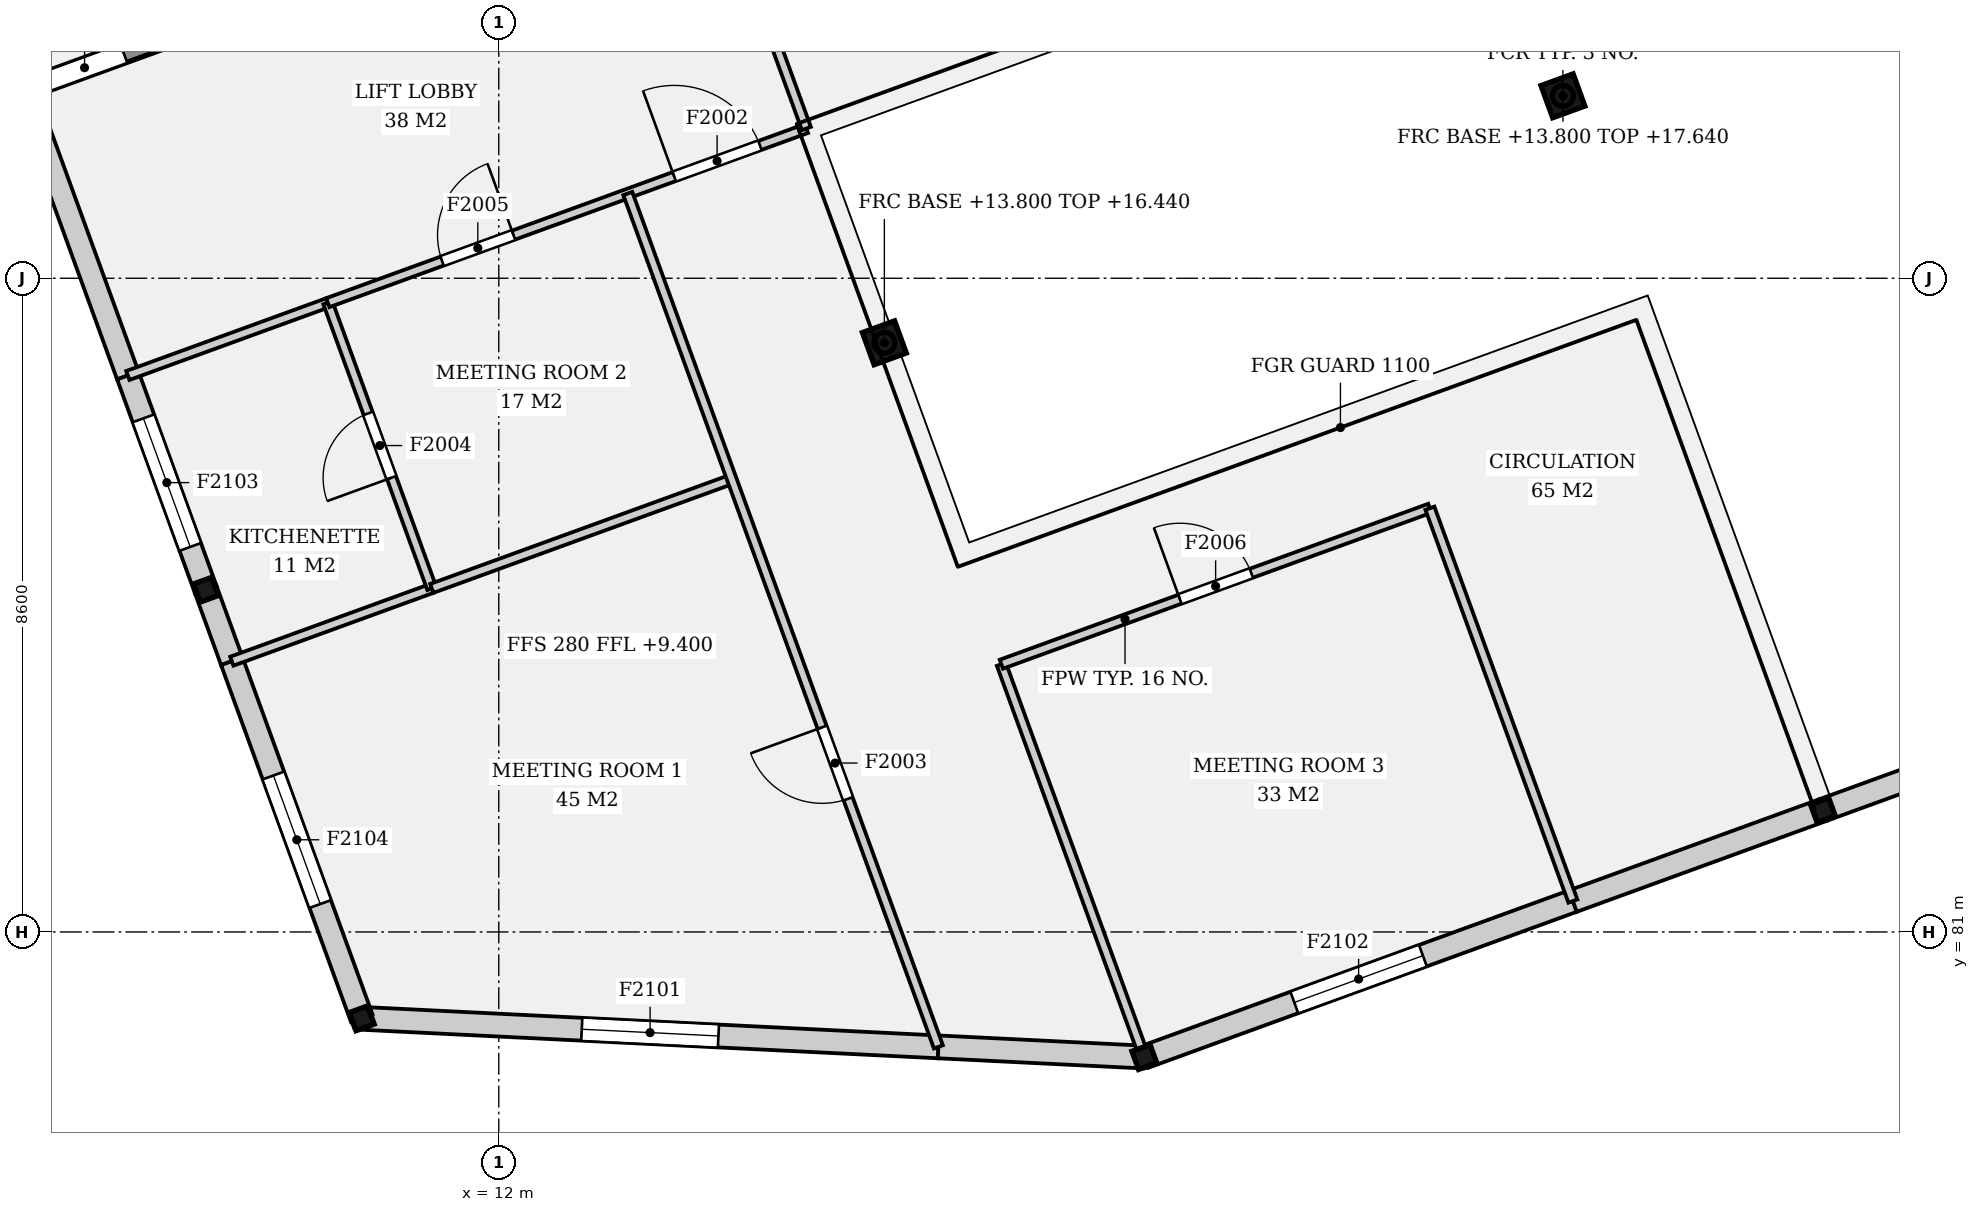
"""IFC4 building model, lengths in metres.
Left out: names, types, materials, properties, quantities, classifications, styles, units other than length and angle.
Written with IfcOpenShell. Run it as: python <this file> out.ifc"""

import sys

from ifc_helpers import new_model, si_unit, direction, frame, frame_2d, origin, origin_2d, place, context, subcontext, project, spatial, rectangle, hollow_rectangle, hollow_circle, extrude, element, fill, save


model = new_model("IFC4")
c1 = context("Model", 3, precision=1e-05, world=origin(), true_north=direction((0.0, 1.0)))
c2 = subcontext(c1, "Body", "Model", "MODEL_VIEW")
j1 = project(units=[si_unit("LENGTHUNIT", "METRE"), si_unit("PLANEANGLEUNIT", "RADIAN")], contexts=[c1])
p1 = place(None, origin())
s1 = spatial("IfcSite", under=j1, at=p1, CompositionType="ELEMENT")
p2 = place(p1, origin())
s2 = spatial("IfcBuilding", under=s1, at=p2, CompositionType="ELEMENT")
p3 = place(p2, frame((0.0, 0.0, 9.4)))
s3 = spatial("IfcBuildingStorey", under=s2, at=p3, CompositionType="ELEMENT", Elevation=9.4)
for number, where, z_axis, x_axis in (
    (1, (10.198, 79.864, 0.0), (0.0, 0.0, 1.0), (0.94, 0.342, 0.0)),
    (2, (20.493, 79.354, 0.0), (0.0, 0.0, 1.0), (0.94, 0.342, 0.0)),
    (3, (29.42, 82.603, 0.0), (0.0, 0.0, 1.0), (0.94, 0.342, 0.0)),
    (4, (8.146, 85.502, 0.0), (0.0, 0.0, 1.0), (0.94, 0.342, 0.0)),
):
    element("IfcColumn", number, at=place(p3, frame(where, z_axis=z_axis, x_axis=x_axis)), inside=s3, PredefinedType="COLUMN", context=c2, shape_type="SweptSolid", body=[
        extrude(hollow_rectangle(XDim=0.254, YDim=0.254, WallThickness=0.012, at=origin_2d()), origin(), (0.0, 0.0, 1.0), 4.4),
    ])
for number, where, z_axis, x_axis in (
    (5, (17.073, 88.751, 0.0), (0.0, 0.0, 1.0), (0.94, 0.342, 0.0)),
    (6, (26.0, 92.0, 0.0), (0.0, 0.0, 1.0), (0.94, 0.342, 0.0)),
):
    element("IfcColumn", number, at=place(p3, frame(where, z_axis=z_axis, x_axis=x_axis)), inside=s3, PredefinedType="COLUMN", context=c2, shape_type="SweptSolid", body=[
        extrude(rectangle(XDim=0.45, YDim=0.45, at=origin_2d()), origin(), (0.0, 0.0, 1.0), 4.4),
    ])
p4 = place(p3, frame((5.752, 92.08, 0.0), z_axis=(0.0, 0.0, 1.0), x_axis=(0.939697665127, 0.342006283793, 0.0)))
e7 = element("IfcWall", 7, at=p4, inside=s3, PredefinedType="SOLIDWALL", context=c2, shape_type="SweptSolid", body=[
    extrude(rectangle(XDim=7.0, YDim=0.25, at=frame_2d((3.5, 0.0))), origin(), (0.0, 0.0, 1.0), 4.4),
])
p5 = place(p4, frame((0.3, 0.0, 0.0)))
e8 = element("IfcOpeningElement", 8, at=p5, cuts=e7, PredefinedType="OPENING", context=c2, shape_type="SweptSolid", body=[
    extrude(rectangle(XDim=1.1, YDim=2.1, at=frame_2d((0.55, 1.05))), frame((0.0, 0.135, 0.0), z_axis=(0.0, -1.0, 0.0), x_axis=(1.0, 0.0, 0.0)), (0.0, 0.0, 1.0), 0.27),
])
p6 = place(p3, frame((17.073, 88.751, 4.4), z_axis=(0.0, 0.0, 1.0), x_axis=(1.0, 0.0, 0.0)))
e9 = element("IfcColumn", 9, at=p6, inside=s3, PredefinedType="COLUMN", context=c2, shape_type="SweptSolid", body=[
    extrude(hollow_circle(Radius=0.136, WallThickness=0.01, at=origin_2d()), origin(), (0.0, 0.0, 1.0), 2.64),
])
p7 = place(p3, frame((26.0, 92.0, 4.4), z_axis=(0.0, 0.0, 1.0), x_axis=(1.0, 0.0, 0.0)))
e10 = element("IfcColumn", 10, at=p7, inside=s3, PredefinedType="COLUMN", context=c2, shape_type="SweptSolid", body=[
    extrude(hollow_circle(Radius=0.136, WallThickness=0.01, at=origin_2d()), origin(), (0.0, 0.0, 1.0), 3.84),
])
p8 = place(p3, frame((10.198, 79.864, 0.0), z_axis=(0.0, 0.0, 1.0), x_axis=(0.998777223391, -0.049437415344, 0.0)))
e11 = element("IfcWall", 11, at=p8, inside=s3, PredefinedType="ELEMENTEDWALL", context=c2, shape_type="SweptSolid", body=[
    extrude(rectangle(XDim=7.595, YDim=0.3, at=frame_2d((3.798, 0.0))), origin(), (0.0, 0.0, 1.0), 4.4),
])
p9 = place(p8, frame((2.898, 0.0, 0.9)))
e12 = element("IfcOpeningElement", 12, at=p9, cuts=e11, PredefinedType="OPENING", context=c2, shape_type="SweptSolid", body=[
    extrude(rectangle(XDim=1.8, YDim=2.4, at=frame_2d((0.9, 1.2))), frame((0.0, 0.16, 0.0), z_axis=(0.0, -1.0, 0.0), x_axis=(1.0, 0.0, 0.0)), (0.0, 0.0, 1.0), 0.32),
])
p10 = place(p3, frame((17.784, 79.488, 0.0), z_axis=(0.0, 0.0, 1.0), x_axis=(0.998778461407, -0.049412397523, 0.0)))
e13 = element("IfcWall", 13, at=p10, inside=s3, PredefinedType="ELEMENTEDWALL", context=c2, shape_type="SweptSolid", body=[
    extrude(rectangle(XDim=2.713, YDim=0.3, at=frame_2d((1.356, 0.0))), origin(), (0.0, 0.0, 1.0), 4.4),
])
p11 = place(p3, frame((20.493, 79.354, 0.0), z_axis=(0.0, 0.0, 1.0), x_axis=(0.939699533273, 0.342001150825, 0.0)))
e14 = element("IfcWall", 14, at=p11, inside=s3, PredefinedType="ELEMENTEDWALL", context=c2, shape_type="SweptSolid", body=[
    extrude(rectangle(XDim=6.0, YDim=0.3, at=frame_2d((3.0, 0.0))), origin(), (0.0, 0.0, 1.0), 4.4),
])
p12 = place(p11, frame((2.1, 0.0, 0.9)))
e15 = element("IfcOpeningElement", 15, at=p12, cuts=e14, PredefinedType="OPENING", context=c2, shape_type="SweptSolid", body=[
    extrude(rectangle(XDim=1.8, YDim=2.4, at=frame_2d((0.9, 1.2))), frame((0.0, 0.16, 0.0), z_axis=(0.0, -1.0, 0.0), x_axis=(1.0, 0.0, 0.0)), (0.0, 0.0, 1.0), 0.32),
])
p13 = place(p3, frame((26.131, 81.406, 0.0), z_axis=(0.0, 0.0, 1.0), x_axis=(0.939693585395, 0.342017493073, 0.0)))
e16 = element("IfcWall", 16, at=p13, inside=s3, PredefinedType="ELEMENTEDWALL", context=c2, shape_type="SweptSolid", body=[
    extrude(rectangle(XDim=3.5, YDim=0.3, at=frame_2d((1.75, 0.0))), origin(), (0.0, 0.0, 1.0), 4.4),
])
p14 = place(p3, frame((29.42, 82.603, 0.0), z_axis=(0.0, 0.0, 1.0), x_axis=(0.939692088769, 0.342021605027, 0.0)))
e17 = element("IfcWall", 17, at=p14, inside=s3, PredefinedType="ELEMENTEDWALL", context=c2, shape_type="SweptSolid", body=[
    extrude(rectangle(XDim=9.5, YDim=0.3, at=frame_2d((4.75, 0.0))), origin(), (0.0, 0.0, 1.0), 4.4),
])
p15 = place(p3, frame((5.752, 92.08, 0.0), z_axis=(0.0, 0.0, 1.0), x_axis=(0.342037080957, -0.939686455819, 0.0)))
e18 = element("IfcWall", 18, at=p15, inside=s3, PredefinedType="ELEMENTEDWALL", context=c2, shape_type="SweptSolid", body=[
    extrude(rectangle(XDim=4.0, YDim=0.3, at=frame_2d((2.0, 0.0))), origin(), (0.0, 0.0, 1.0), 4.4),
])
p16 = place(p3, frame((7.12, 88.321, 0.0), z_axis=(0.0, 0.0, 1.0), x_axis=(0.341965219194, -0.939712609717, 0.0)))
e19 = element("IfcWall", 19, at=p16, inside=s3, PredefinedType="ELEMENTEDWALL", context=c2, shape_type="SweptSolid", body=[
    extrude(rectangle(XDim=3.0, YDim=0.3, at=frame_2d((1.5, 0.0))), origin(), (0.0, 0.0, 1.0), 4.4),
])
p17 = place(p16, frame((0.6, 0.0, 0.9)))
e20 = element("IfcOpeningElement", 20, at=p17, cuts=e19, PredefinedType="OPENING", context=c2, shape_type="SweptSolid", body=[
    extrude(rectangle(XDim=1.8, YDim=2.4, at=frame_2d((0.9, 1.2))), frame((0.0, 0.16, 0.0), z_axis=(0.0, -1.0, 0.0), x_axis=(1.0, 0.0, 0.0)), (0.0, 0.0, 1.0), 0.32),
])
p18 = place(p3, frame((8.146, 85.502, 0.0), z_axis=(0.0, 0.0, 1.0), x_axis=(0.342037080957, -0.939686455819, 0.0)))
e21 = element("IfcWall", 21, at=p18, inside=s3, PredefinedType="ELEMENTEDWALL", context=c2, shape_type="SweptSolid", body=[
    extrude(rectangle(XDim=1.0, YDim=0.3, at=frame_2d((0.5, 0.0))), origin(), (0.0, 0.0, 1.0), 4.4),
])
p19 = place(p3, frame((8.488, 84.562, 0.0), z_axis=(0.0, 0.0, 1.0), x_axis=(0.342037080957, -0.939686455819, 0.0)))
e22 = element("IfcWall", 22, at=p19, inside=s3, PredefinedType="ELEMENTEDWALL", context=c2, shape_type="SweptSolid", body=[
    extrude(rectangle(XDim=5.0, YDim=0.3, at=frame_2d((2.5, 0.0))), origin(), (0.0, 0.0, 1.0), 4.4),
])
p20 = place(p19, frame((1.6, 0.0, 0.9)))
e23 = element("IfcOpeningElement", 23, at=p20, cuts=e22, PredefinedType="OPENING", context=c2, shape_type="SweptSolid", body=[
    extrude(rectangle(XDim=1.8, YDim=2.4, at=frame_2d((0.9, 1.2))), frame((0.0, 0.16, 0.0), z_axis=(0.0, -1.0, 0.0), x_axis=(1.0, 0.0, 0.0)), (0.0, 0.0, 1.0), 0.32),
])
for number, where, z_axis, x_axis in (
    (24, (8.488, 84.562, 0.0), (0.0, 0.0, 1.0), (0.94, 0.342, 0.0)),
    (25, (7.12, 88.321, 0.0), (0.0, 0.0, 1.0), (0.94, 0.342, 0.0)),
):
    element("IfcWall", number, at=place(p3, frame(where, z_axis=z_axis, x_axis=x_axis)), inside=s3, PredefinedType="PARTITIONING", context=c2, shape_type="SweptSolid", body=[
        extrude(rectangle(XDim=2.8, YDim=0.125, at=frame_2d((1.4, 0.0))), origin(), (0.0, 0.0, 1.0), 4.4),
    ])
p21 = place(p3, frame((11.119, 85.52, 0.0), z_axis=(0.0, 0.0, 1.0), x_axis=(-0.341983185197, 0.939706071622, 0.0)))
e26 = element("IfcWall", 26, at=p21, inside=s3, PredefinedType="PARTITIONING", context=c2, shape_type="SweptSolid", body=[
    extrude(rectangle(XDim=4.0, YDim=0.125, at=frame_2d((2.0, 0.0))), origin(), (0.0, 0.0, 1.0), 4.4),
])
p22 = place(p21, frame((1.55, 0.0, 0.0)))
e27 = element("IfcOpeningElement", 27, at=p22, cuts=e26, PredefinedType="OPENING", context=c2, shape_type="SweptSolid", body=[
    extrude(rectangle(XDim=0.9, YDim=2.1, at=frame_2d((0.45, 1.05))), frame((0.0, 0.073, 0.0), z_axis=(0.0, -1.0, 0.0), x_axis=(1.0, 0.0, 0.0)), (0.0, 0.0, 1.0), 0.145),
])
p23 = place(p3, frame((9.751, 89.278, 0.0), z_axis=(0.0, 0.0, 1.0), x_axis=(0.939693375008, 0.342018071111, 0.0)))
e28 = element("IfcWall", 28, at=p23, inside=s3, PredefinedType="PARTITIONING", context=c2, shape_type="SweptSolid", body=[
    extrude(rectangle(XDim=6.7, YDim=0.125, at=frame_2d((3.35, 0.0))), origin(), (0.0, 0.0, 1.0), 4.4),
])
p24 = place(p23, frame((4.85, 0.0, 0.0)))
e29 = element("IfcOpeningElement", 29, at=p24, cuts=e28, PredefinedType="OPENING", context=c2, shape_type="SweptSolid", body=[
    extrude(rectangle(XDim=1.2, YDim=2.1, at=frame_2d((0.6, 1.05))), frame((0.0, 0.073, 0.0), z_axis=(0.0, -1.0, 0.0), x_axis=(1.0, 0.0, 0.0)), (0.0, 0.0, 1.0), 0.145),
])
p25 = place(p23, frame((1.6, 0.0, 0.0)))
e30 = element("IfcOpeningElement", 30, at=p25, cuts=e28, PredefinedType="OPENING", context=c2, shape_type="SweptSolid", body=[
    extrude(rectangle(XDim=1.0, YDim=2.1, at=frame_2d((0.5, 1.05))), frame((0.0, 0.073, 0.0), z_axis=(0.0, -1.0, 0.0), x_axis=(1.0, 0.0, 0.0)), (0.0, 0.0, 1.0), 0.145),
])
p26 = place(p3, frame((16.047, 91.57, 0.0), z_axis=(0.0, 0.0, 1.0), x_axis=(-0.342037080957, 0.939686455819, 0.0)))
e31 = element("IfcWall", 31, at=p26, inside=s3, PredefinedType="PARTITIONING", context=c2, shape_type="SweptSolid", body=[
    extrude(rectangle(XDim=4.0, YDim=0.125, at=frame_2d((2.0, 0.0))), origin(), (0.0, 0.0, 1.0), 4.4),
])
p27 = place(p3, frame((11.119, 85.52, 0.0), z_axis=(0.0, 0.0, 1.0), x_axis=(0.939691552312, 0.342023078919, 0.0)))
e32 = element("IfcWall", 32, at=p27, inside=s3, PredefinedType="PARTITIONING", context=c2, shape_type="SweptSolid", body=[
    extrude(rectangle(XDim=4.2, YDim=0.125, at=frame_2d((2.1, 0.0))), origin(), (0.0, 0.0, 1.0), 4.4),
])
p28 = place(p3, frame((17.784, 79.488, 0.0), z_axis=(0.0, 0.0, 1.0), x_axis=(-0.342035097943, 0.939687177615, 0.0)))
e33 = element("IfcWall", 33, at=p28, inside=s3, PredefinedType="PARTITIONING", context=c2, shape_type="SweptSolid", body=[
    extrude(rectangle(XDim=11.947, YDim=0.125, at=frame_2d((5.974, 0.0))), origin(), (0.0, 0.0, 1.0), 4.4),
])
p29 = place(p28, frame((3.474, 0.0, 0.0)))
e34 = element("IfcOpeningElement", 34, at=p29, cuts=e33, PredefinedType="OPENING", context=c2, shape_type="SweptSolid", body=[
    extrude(rectangle(XDim=1.0, YDim=2.1, at=frame_2d((0.5, 1.05))), frame((0.0, 0.073, 0.0), z_axis=(0.0, -1.0, 0.0), x_axis=(1.0, 0.0, 0.0)), (0.0, 0.0, 1.0), 0.145),
])
p30 = place(p3, frame((20.493, 79.354, 0.0), z_axis=(0.0, 0.0, 1.0), x_axis=(-0.34202461616, 0.939690992795, 0.0)))
e35 = element("IfcWall", 35, at=p30, inside=s3, PredefinedType="PARTITIONING", context=c2, shape_type="SweptSolid", body=[
    extrude(rectangle(XDim=5.5, YDim=0.125, at=frame_2d((2.75, 0.0))), origin(), (0.0, 0.0, 1.0), 4.4),
])
p31 = place(p3, frame((18.612, 84.522, 0.0), z_axis=(0.0, 0.0, 1.0), x_axis=(0.939699533273, 0.342001150825, 0.0)))
e36 = element("IfcWall", 36, at=p31, inside=s3, PredefinedType="PARTITIONING", context=c2, shape_type="SweptSolid", body=[
    extrude(rectangle(XDim=6.0, YDim=0.125, at=frame_2d((3.0, 0.0))), origin(), (0.0, 0.0, 1.0), 4.4),
])
p32 = place(p31, frame((2.5, 0.0, 0.0)))
e37 = element("IfcOpeningElement", 37, at=p32, cuts=e36, PredefinedType="OPENING", context=c2, shape_type="SweptSolid", body=[
    extrude(rectangle(XDim=1.0, YDim=2.1, at=frame_2d((0.5, 1.05))), frame((0.0, 0.073, 0.0), z_axis=(0.0, -1.0, 0.0), x_axis=(1.0, 0.0, 0.0)), (0.0, 0.0, 1.0), 0.145),
])
p33 = place(p3, frame((26.131, 81.406, 0.0), z_axis=(0.0, 0.0, 1.0), x_axis=(-0.34202461616, 0.939690992795, 0.0)))
e38 = element("IfcWall", 38, at=p33, inside=s3, PredefinedType="PARTITIONING", context=c2, shape_type="SweptSolid", body=[
    extrude(rectangle(XDim=5.5, YDim=0.125, at=frame_2d((2.75, 0.0))), origin(), (0.0, 0.0, 1.0), 4.4),
])
p34 = place(p9, origin())
e39 = element("IfcWindow", 39, at=p34, inside=s3, PartitioningType="SINGLE_PANEL", PredefinedType="WINDOW", context=c2, shape_type="SweptSolid", body=[
    extrude(rectangle(XDim=1.8, YDim=2.4, at=frame_2d((0.9, 1.2))), frame((0.0, 0.03, 0.0), z_axis=(0.0, -1.0, 0.0), x_axis=(1.0, 0.0, 0.0)), (0.0, 0.0, 1.0), 0.06),
])
fill(e12, e39)
p35 = place(p12, origin())
e40 = element("IfcWindow", 40, at=p35, inside=s3, PartitioningType="SINGLE_PANEL", PredefinedType="WINDOW", context=c2, shape_type="SweptSolid", body=[
    extrude(rectangle(XDim=1.8, YDim=2.4, at=frame_2d((0.9, 1.2))), frame((0.0, 0.03, 0.0), z_axis=(0.0, -1.0, 0.0), x_axis=(1.0, 0.0, 0.0)), (0.0, 0.0, 1.0), 0.06),
])
fill(e15, e40)
p36 = place(p17, origin())
e41 = element("IfcWindow", 41, at=p36, inside=s3, PartitioningType="SINGLE_PANEL", PredefinedType="WINDOW", context=c2, shape_type="SweptSolid", body=[
    extrude(rectangle(XDim=1.8, YDim=2.4, at=frame_2d((0.9, 1.2))), frame((0.0, 0.03, 0.0), z_axis=(0.0, -1.0, 0.0), x_axis=(1.0, 0.0, 0.0)), (0.0, 0.0, 1.0), 0.06),
])
fill(e20, e41)
p37 = place(p20, origin())
e42 = element("IfcWindow", 42, at=p37, inside=s3, PartitioningType="SINGLE_PANEL", PredefinedType="WINDOW", context=c2, shape_type="SweptSolid", body=[
    extrude(rectangle(XDim=1.8, YDim=2.4, at=frame_2d((0.9, 1.2))), frame((0.0, 0.03, 0.0), z_axis=(0.0, -1.0, 0.0), x_axis=(1.0, 0.0, 0.0)), (0.0, 0.0, 1.0), 0.06),
])
fill(e23, e42)
p38 = place(p5, origin())
e43 = element("IfcDoor", 43, at=p38, inside=s3, OperationType="SINGLE_SWING_RIGHT", PredefinedType="DOOR", context=c2, shape_type="SweptSolid", body=[
    extrude(rectangle(XDim=1.1, YDim=2.1, at=frame_2d((0.55, 1.05))), frame((0.0, 0.025, 0.0), z_axis=(0.0, -1.0, 0.0), x_axis=(1.0, 0.0, 0.0)), (0.0, 0.0, 1.0), 0.05),
])
fill(e8, e43)
p39 = place(p24, origin())
e44 = element("IfcDoor", 44, at=p39, inside=s3, OperationType="SINGLE_SWING_LEFT", PredefinedType="DOOR", context=c2, shape_type="SweptSolid", body=[
    extrude(rectangle(XDim=1.2, YDim=2.1, at=frame_2d((0.6, 1.05))), frame((0.0, 0.025, 0.0), z_axis=(0.0, -1.0, 0.0), x_axis=(1.0, 0.0, 0.0)), (0.0, 0.0, 1.0), 0.05),
])
fill(e29, e44)
p40 = place(p29, origin())
e45 = element("IfcDoor", 45, at=p40, inside=s3, OperationType="SINGLE_SWING_RIGHT", PredefinedType="DOOR", context=c2, shape_type="SweptSolid", body=[
    extrude(rectangle(XDim=1.0, YDim=2.1, at=frame_2d((0.5, 1.05))), frame((0.0, 0.025, 0.0), z_axis=(0.0, -1.0, 0.0), x_axis=(1.0, 0.0, 0.0)), (0.0, 0.0, 1.0), 0.05),
])
fill(e34, e45)
p41 = place(p22, origin())
e46 = element("IfcDoor", 46, at=p41, inside=s3, OperationType="SINGLE_SWING_LEFT", PredefinedType="DOOR", context=c2, shape_type="SweptSolid", body=[
    extrude(rectangle(XDim=0.9, YDim=2.1, at=frame_2d((0.45, 1.05))), frame((0.0, 0.025, 0.0), z_axis=(0.0, -1.0, 0.0), x_axis=(1.0, 0.0, 0.0)), (0.0, 0.0, 1.0), 0.05),
])
fill(e27, e46)
p42 = place(p25, origin())
e47 = element("IfcDoor", 47, at=p42, inside=s3, OperationType="SINGLE_SWING_RIGHT", PredefinedType="DOOR", context=c2, shape_type="SweptSolid", body=[
    extrude(rectangle(XDim=1.0, YDim=2.1, at=frame_2d((0.5, 1.05))), frame((0.0, 0.025, 0.0), z_axis=(0.0, -1.0, 0.0), x_axis=(1.0, 0.0, 0.0)), (0.0, 0.0, 1.0), 0.05),
])
fill(e30, e47)
p43 = place(p32, origin())
e48 = element("IfcDoor", 48, at=p43, inside=s3, OperationType="SINGLE_SWING_LEFT", PredefinedType="DOOR", context=c2, shape_type="SweptSolid", body=[
    extrude(rectangle(XDim=1.0, YDim=2.1, at=frame_2d((0.5, 1.05))), frame((0.0, 0.025, 0.0), z_axis=(0.0, -1.0, 0.0), x_axis=(1.0, 0.0, 0.0)), (0.0, 0.0, 1.0), 0.05),
])
fill(e37, e48)
save(model, sys.argv[1])
